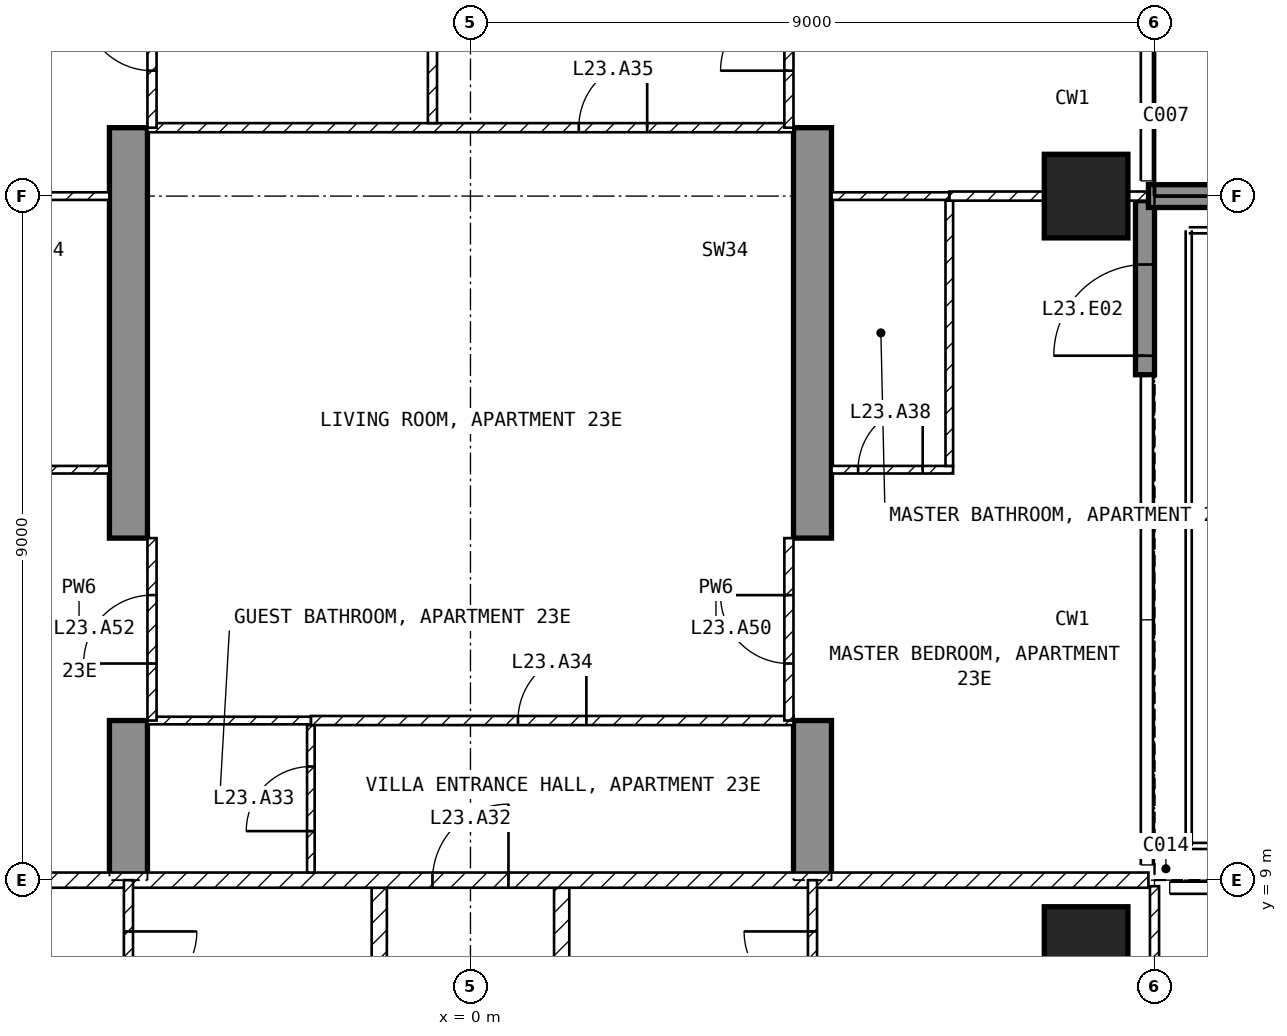
"""IFC4 building model, lengths in metres.
Left out: names, types, materials, properties, quantities, classifications, styles, units other than length and angle.
Written with IfcOpenShell. Run it as: python <this file> out.ifc"""

import sys

from ifc_helpers import new_model, si_unit, direction, frame, frame_2d, origin, origin_2d, place, context, subcontext, project, spatial, polyline, rectangle, outline, extrude, element, fill, save


model = new_model("IFC4")
c1 = context("Model", 3, precision=1e-05, world=origin(), true_north=direction((0.0, 1.0)))
c2 = subcontext(c1, "Body", "Model", "MODEL_VIEW")
j1 = project(units=[si_unit("LENGTHUNIT", "METRE"), si_unit("PLANEANGLEUNIT", "RADIAN")], contexts=[c1])
p1 = place(None, origin())
s1 = spatial("IfcSite", under=j1, at=p1, CompositionType="ELEMENT")
p2 = place(p1, origin())
s2 = spatial("IfcBuilding", under=s1, at=p2, CompositionType="ELEMENT")
p3 = place(p2, frame((0.0, 0.0, 102.4)))
s3 = spatial("IfcBuildingStorey", under=s2, at=p3, CompositionType="ELEMENT", Elevation=102.4)
for number, where, z_axis, x_axis in (
    (1, (8.1, 8.1, -0.25), (0.0, 0.0, 1.0), (1.0, 0.0, 0.0)),
    (2, (8.1, 18.0, -0.25), (0.0, 0.0, 1.0), (1.0, 0.0, 0.0)),
):
    element("IfcColumn", number, at=place(p3, frame(where, z_axis=z_axis, x_axis=x_axis)), inside=s3, PredefinedType="COLUMN", context=c2, shape_type="SweptSolid", body=[
        extrude(rectangle(XDim=1.1, YDim=1.1, at=origin_2d()), origin(), (0.0, 0.0, 1.0), 3.5),
    ])
for number, where, z_axis, x_axis in (
    (3, (-4.75, 9.0, -0.25), (1.0, 0.0, 0.0), (0.0, 1.0, 0.0)),
    (4, (4.25, 9.0, -0.25), (1.0, 0.0, 0.0), (0.0, 1.0, 0.0)),
):
    element("IfcWall", number, at=place(p3, frame(where, z_axis=z_axis, x_axis=x_axis)), inside=s3, PredefinedType="SHEAR", context=c2, shape_type="SweptSolid", body=[
        extrude(outline(polyline([(0.0, 0.0), (2.1, 0.0), (2.1, 2.65), (4.5, 2.65), (4.5, 0.0), (9.9, 0.0), (9.9, 2.65), (12.3, 2.65), (12.3, 0.0), (16.55, 0.0), (16.55, 3.5), (0.0, 3.5), (0.0, 0.0)])), origin(), (0.0, 0.0, 1.0), 0.5),
    ])
p4 = place(p3, frame((8.875, 15.65, 0.0), z_axis=(0.0, 0.0, 1.0), x_axis=(0.0, 1.0, 0.0)))
e5 = element("IfcWall", 5, at=p4, inside=s3, PredefinedType="SOLIDWALL", context=c2, shape_type="SweptSolid", body=[
    extrude(rectangle(XDim=2.29, YDim=0.25, at=frame_2d((1.145, 0.0))), origin(), (0.0, 0.0, 1.0), 3.25),
])
p5 = place(p4, frame((0.25, 0.0, 0.0)))
e6 = element("IfcOpeningElement", 6, at=p5, cuts=e5, PredefinedType="OPENING", context=c2, shape_type="SweptSolid", body=[
    extrude(rectangle(XDim=1.2, YDim=2.4, at=frame_2d((0.6, 1.2))), frame((0.0, 0.135, 0.0), z_axis=(0.0, -1.0, 0.0), x_axis=(1.0, 0.0, 0.0)), (0.0, 0.0, 1.0), 0.27),
])
p6 = place(p3, frame((8.92, 18.0, 0.0), z_axis=(0.0, 0.0, 1.0), x_axis=(1.0, 0.0, 0.0)))
e7 = element("IfcWall", 7, at=p6, inside=s3, PredefinedType="SOLIDWALL", context=c2, shape_type="SweptSolid", body=[
    extrude(rectangle(XDim=2.82, YDim=0.3, at=frame_2d((1.41, 0.0))), origin(), (0.0, 0.0, 1.0), 3.25),
])
for number, where, z_axis, x_axis in (
    (8, (1.2, 8.9, 0.0), (0.0, 0.0, 1.0), (0.0, -1.0, 0.0)),
    (9, (-1.2, 4.6, 0.0), (0.0, 0.0, 1.0), (0.0, 1.0, 0.0)),
):
    element("IfcWall", number, at=place(p3, frame(where, z_axis=z_axis, x_axis=x_axis)), inside=s3, PredefinedType="PARTITIONING", context=c2, shape_type="SweptSolid", body=[
        extrude(rectangle(XDim=4.3, YDim=0.2, at=frame_2d((2.15, 0.0))), origin(), (0.0, 0.0, 1.0), 3.25),
    ])
p7 = place(p3, frame((-8.92, 9.0, 0.0), z_axis=(0.0, 0.0, 1.0), x_axis=(1.0, 0.0, 0.0)))
e10 = element("IfcWall", 10, at=p7, inside=s3, PredefinedType="PARTITIONING", context=c2, shape_type="SweptSolid", body=[
    extrude(rectangle(XDim=17.84, YDim=0.2, at=frame_2d((8.92, 0.0))), origin(), (0.0, 0.0, 1.0), 3.25),
])
p8 = place(p7, frame((8.42, 0.0, 0.0)))
e11 = element("IfcOpeningElement", 11, at=p8, cuts=e10, PredefinedType="OPENING", context=c2, shape_type="SweptSolid", body=[
    extrude(rectangle(XDim=1.0, YDim=2.1, at=frame_2d((0.5, 1.05))), frame((0.0, 0.11, 0.0), z_axis=(0.0, -1.0, 0.0), x_axis=(1.0, 0.0, 0.0)), (0.0, 0.0, 1.0), 0.22),
])
p9 = place(p3, frame((9.0, 1.3, 0.0), z_axis=(0.0, 0.0, 1.0), x_axis=(0.0, 1.0, 0.0)))
e12 = element("IfcWall", 12, at=p9, inside=s3, PredefinedType="PARTITIONING", context=c2, shape_type="SweptSolid", body=[
    extrude(rectangle(XDim=7.62, YDim=0.12, at=frame_2d((3.81, 0.0))), origin(), (0.0, 0.0, 1.0), 3.25),
])
p10 = place(p9, frame((0.85, 0.0, 0.0)))
e13 = element("IfcOpeningElement", 13, at=p10, cuts=e12, PredefinedType="OPENING", context=c2, shape_type="SweptSolid", body=[
    extrude(rectangle(XDim=0.9, YDim=2.1, at=frame_2d((0.45, 1.05))), frame((0.0, 0.07, 0.0), z_axis=(0.0, -1.0, 0.0), x_axis=(1.0, 0.0, 0.0)), (0.0, 0.0, 1.0), 0.14),
])
p11 = place(p3, frame((4.5, 6.75, 0.0), z_axis=(0.0, 0.0, 1.0), x_axis=(0.0, 1.0, 0.0)))
e14 = element("IfcWall", 14, at=p11, inside=s3, PredefinedType="PARTITIONING", context=c2, shape_type="SweptSolid", body=[
    extrude(rectangle(XDim=2.25, YDim=0.12, at=frame_2d((1.125, 0.0))), origin(), (0.0, 0.0, 1.0), 3.25),
])
p12 = place(p11, frame((0.675, 0.0, 0.0)))
e15 = element("IfcOpeningElement", 15, at=p12, cuts=e14, PredefinedType="OPENING", context=c2, shape_type="SweptSolid", body=[
    extrude(rectangle(XDim=0.9, YDim=2.1, at=frame_2d((0.45, 1.05))), frame((0.0, 0.07, 0.0), z_axis=(0.0, -1.0, 0.0), x_axis=(1.0, 0.0, 0.0)), (0.0, 0.0, 1.0), 0.14),
])
p13 = place(p3, frame((-4.5, 9.0, 0.0), z_axis=(0.0, 0.0, 1.0), x_axis=(0.0, -1.0, 0.0)))
e16 = element("IfcWall", 16, at=p13, inside=s3, PredefinedType="PARTITIONING", context=c2, shape_type="SweptSolid", body=[
    extrude(rectangle(XDim=2.25, YDim=0.12, at=frame_2d((1.125, 0.0))), origin(), (0.0, 0.0, 1.0), 3.25),
])
p14 = place(p13, frame((0.675, 0.0, 0.0)))
e17 = element("IfcOpeningElement", 17, at=p14, cuts=e16, PredefinedType="OPENING", context=c2, shape_type="SweptSolid", body=[
    extrude(rectangle(XDim=0.9, YDim=2.1, at=frame_2d((0.45, 1.05))), frame((0.0, 0.07, 0.0), z_axis=(0.0, -1.0, 0.0), x_axis=(1.0, 0.0, 0.0)), (0.0, 0.0, 1.0), 0.14),
])
p15 = place(p3, frame((-2.1, 9.1, 0.0), z_axis=(0.0, 0.0, 1.0), x_axis=(0.0, 1.0, 0.0)))
e18 = element("IfcWall", 18, at=p15, inside=s3, PredefinedType="PARTITIONING", context=c2, shape_type="SweptSolid", body=[
    extrude(rectangle(XDim=1.94, YDim=0.1, at=frame_2d((0.97, 0.0))), origin(), (0.0, 0.0, 1.0), 3.25),
])
p16 = place(p15, frame((0.545, 0.0, 0.0)))
e19 = element("IfcOpeningElement", 19, at=p16, cuts=e18, PredefinedType="OPENING", context=c2, shape_type="SweptSolid", body=[
    extrude(rectangle(XDim=0.85, YDim=2.1, at=frame_2d((0.425, 1.05))), frame((0.0, 0.06, 0.0), z_axis=(0.0, -1.0, 0.0), x_axis=(1.0, 0.0, 0.0)), (0.0, 0.0, 1.0), 0.12),
])
p17 = place(p3, frame((-2.1, 11.1, 0.0), z_axis=(0.0, 0.0, 1.0), x_axis=(1.0, 0.0, 0.0)))
e20 = element("IfcWall", 20, at=p17, inside=s3, PredefinedType="PARTITIONING", context=c2, shape_type="SweptSolid", body=[
    extrude(rectangle(XDim=6.35, YDim=0.12, at=frame_2d((3.175, 0.0))), origin(), (0.0, 0.0, 1.0), 3.25),
])
p18 = place(p17, frame((2.725, 0.0, 0.0)))
e21 = element("IfcOpeningElement", 21, at=p18, cuts=e20, PredefinedType="OPENING", context=c2, shape_type="SweptSolid", body=[
    extrude(rectangle(XDim=0.9, YDim=2.1, at=frame_2d((0.45, 1.05))), frame((0.0, 0.07, 0.0), z_axis=(0.0, -1.0, 0.0), x_axis=(1.0, 0.0, 0.0)), (0.0, 0.0, 1.0), 0.14),
])
p19 = place(p3, frame((-4.25, 11.1, 0.0), z_axis=(0.0, 0.0, 1.0), x_axis=(1.0, 0.0, 0.0)))
e22 = element("IfcWall", 22, at=p19, inside=s3, PredefinedType="PARTITIONING", context=c2, shape_type="SweptSolid", body=[
    extrude(rectangle(XDim=2.15, YDim=0.1, at=frame_2d((1.075, 0.0))), origin(), (0.0, 0.0, 1.0), 3.25),
])
p20 = place(p3, frame((-4.25, 18.9, 0.0), z_axis=(0.0, 0.0, 1.0), x_axis=(1.0, 0.0, 0.0)))
e23 = element("IfcWall", 23, at=p20, inside=s3, PredefinedType="PARTITIONING", context=c2, shape_type="SweptSolid", body=[
    extrude(rectangle(XDim=8.5, YDim=0.12, at=frame_2d((4.25, 0.0))), origin(), (0.0, 0.0, 1.0), 3.25),
])
p21 = place(p20, frame((5.675, 0.0, 0.0)))
e24 = element("IfcOpeningElement", 24, at=p21, cuts=e23, PredefinedType="OPENING", context=c2, shape_type="SweptSolid", body=[
    extrude(rectangle(XDim=0.9, YDim=2.1, at=frame_2d((0.45, 1.05))), frame((0.0, 0.07, 0.0), z_axis=(0.0, -1.0, 0.0), x_axis=(1.0, 0.0, 0.0)), (0.0, 0.0, 1.0), 0.14),
])
p22 = place(p3, frame((-0.5, 18.96, 0.0), z_axis=(0.0, 0.0, 1.0), x_axis=(0.0, 1.0, 0.0)))
e25 = element("IfcWall", 25, at=p22, inside=s3, PredefinedType="PARTITIONING", context=c2, shape_type="SweptSolid", body=[
    extrude(rectangle(XDim=4.38, YDim=0.12, at=frame_2d((2.19, 0.0))), origin(), (0.0, 0.0, 1.0), 3.25),
])
p23 = place(p22, frame((1.74, 0.0, 0.0)))
e26 = element("IfcOpeningElement", 26, at=p23, cuts=e25, PredefinedType="OPENING", context=c2, shape_type="SweptSolid", body=[
    extrude(rectangle(XDim=0.9, YDim=2.1, at=frame_2d((0.45, 1.05))), frame((0.0, 0.07, 0.0), z_axis=(0.0, -1.0, 0.0), x_axis=(1.0, 0.0, 0.0)), (0.0, 0.0, 1.0), 0.14),
])
p24 = place(p3, frame((4.75, 14.4, 0.0), z_axis=(0.0, 0.0, 1.0), x_axis=(1.0, 0.0, 0.0)))
e27 = element("IfcWall", 27, at=p24, inside=s3, PredefinedType="PARTITIONING", context=c2, shape_type="SweptSolid", body=[
    extrude(rectangle(XDim=1.6, YDim=0.1, at=frame_2d((0.8, 0.0))), origin(), (0.0, 0.0, 1.0), 3.25),
])
p25 = place(p24, frame((0.35, 0.0, 0.0)))
e28 = element("IfcOpeningElement", 28, at=p25, cuts=e27, PredefinedType="OPENING", context=c2, shape_type="SweptSolid", body=[
    extrude(rectangle(XDim=0.85, YDim=2.1, at=frame_2d((0.425, 1.05))), frame((0.0, 0.06, 0.0), z_axis=(0.0, -1.0, 0.0), x_axis=(1.0, 0.0, 0.0)), (0.0, 0.0, 1.0), 0.12),
])
p26 = place(p3, frame((6.3, 14.45, 0.0), z_axis=(0.0, 0.0, 1.0), x_axis=(0.0, 1.0, 0.0)))
e29 = element("IfcWall", 29, at=p26, inside=s3, PredefinedType="PARTITIONING", context=c2, shape_type="SweptSolid", body=[
    extrude(rectangle(XDim=3.49, YDim=0.1, at=frame_2d((1.745, 0.0))), origin(), (0.0, 0.0, 1.0), 3.25),
])
p27 = place(p3, frame((6.3, 18.0, 0.0), z_axis=(0.0, 0.0, 1.0), x_axis=(1.0, 0.0, 0.0)))
e30 = element("IfcWall", 30, at=p27, inside=s3, PredefinedType="PARTITIONING", context=c2, shape_type="SweptSolid", body=[
    extrude(rectangle(XDim=2.62, YDim=0.12, at=frame_2d((1.31, 0.0))), origin(), (0.0, 0.0, 1.0), 2.414),
])
p28 = place(p3, frame((4.75, 18.0, 0.0), z_axis=(0.0, 0.0, 1.0), x_axis=(1.0, 0.0, 0.0)))
e31 = element("IfcWall", 31, at=p28, inside=s3, PredefinedType="PARTITIONING", context=c2, shape_type="SweptSolid", body=[
    extrude(rectangle(XDim=1.55, YDim=0.1, at=frame_2d((0.775, 0.0))), origin(), (0.0, 0.0, 1.0), 2.414),
])
p29 = place(p3, frame((-6.95, 14.4, 0.0), z_axis=(0.0, 0.0, 1.0), x_axis=(1.0, 0.0, 0.0)))
e32 = element("IfcWall", 32, at=p29, inside=s3, PredefinedType="PARTITIONING", context=c2, shape_type="SweptSolid", body=[
    extrude(rectangle(XDim=2.2, YDim=0.1, at=frame_2d((1.1, 0.0))), origin(), (0.0, 0.0, 1.0), 3.25),
])
p30 = place(p3, frame((-6.9, 18.0, 0.0), z_axis=(0.0, 0.0, 1.0), x_axis=(1.0, 0.0, 0.0)))
e33 = element("IfcWall", 33, at=p30, inside=s3, PredefinedType="PARTITIONING", context=c2, shape_type="SweptSolid", body=[
    extrude(rectangle(XDim=2.15, YDim=0.1, at=frame_2d((1.075, 0.0))), origin(), (0.0, 0.0, 1.0), 2.414),
])
p31 = place(p3, frame((4.19, 11.1, 0.0), z_axis=(0.0, 0.0, 1.0), x_axis=(0.0, 1.0, 0.0)))
e34 = element("IfcWall", 34, at=p31, inside=s3, PredefinedType="PARTITIONING", context=c2, shape_type="SweptSolid", body=[
    extrude(rectangle(XDim=2.4, YDim=0.12, at=frame_2d((1.2, 0.0))), origin(), (0.0, 0.0, 1.0), 2.4),
])
p32 = place(p31, frame((0.75, 0.0, 0.0)))
e35 = element("IfcOpeningElement", 35, at=p32, cuts=e34, PredefinedType="OPENING", context=c2, shape_type="SweptSolid", body=[
    extrude(rectangle(XDim=0.9, YDim=2.1, at=frame_2d((0.45, 1.05))), frame((0.0, 0.07, 0.0), z_axis=(0.0, -1.0, 0.0), x_axis=(1.0, 0.0, 0.0)), (0.0, 0.0, 1.0), 0.14),
])
p33 = place(p3, frame((4.19, 18.9, 0.0), z_axis=(0.0, 0.0, 1.0), x_axis=(0.0, 1.0, 0.0)))
e36 = element("IfcWall", 36, at=p33, inside=s3, PredefinedType="PARTITIONING", context=c2, shape_type="SweptSolid", body=[
    extrude(rectangle(XDim=2.4, YDim=0.12, at=frame_2d((1.2, 0.0))), origin(), (0.0, 0.0, 1.0), 2.4),
])
p34 = place(p33, frame((0.75, 0.0, 0.0)))
e37 = element("IfcOpeningElement", 37, at=p34, cuts=e36, PredefinedType="OPENING", context=c2, shape_type="SweptSolid", body=[
    extrude(rectangle(XDim=0.9, YDim=2.1, at=frame_2d((0.45, 1.05))), frame((0.0, 0.07, 0.0), z_axis=(0.0, -1.0, 0.0), x_axis=(1.0, 0.0, 0.0)), (0.0, 0.0, 1.0), 0.14),
])
p35 = place(p3, frame((-4.19, 11.1, 0.0), z_axis=(0.0, 0.0, 1.0), x_axis=(0.0, 1.0, 0.0)))
e38 = element("IfcWall", 38, at=p35, inside=s3, PredefinedType="PARTITIONING", context=c2, shape_type="SweptSolid", body=[
    extrude(rectangle(XDim=2.4, YDim=0.12, at=frame_2d((1.2, 0.0))), origin(), (0.0, 0.0, 1.0), 2.4),
])
p36 = place(p35, frame((0.75, 0.0, 0.0)))
e39 = element("IfcOpeningElement", 39, at=p36, cuts=e38, PredefinedType="OPENING", context=c2, shape_type="SweptSolid", body=[
    extrude(rectangle(XDim=0.9, YDim=2.1, at=frame_2d((0.45, 1.05))), frame((0.0, 0.07, 0.0), z_axis=(0.0, -1.0, 0.0), x_axis=(1.0, 0.0, 0.0)), (0.0, 0.0, 1.0), 0.14),
])
p37 = place(p3, frame((-4.19, 18.9, 0.0), z_axis=(0.0, 0.0, 1.0), x_axis=(0.0, 1.0, 0.0)))
e40 = element("IfcWall", 40, at=p37, inside=s3, PredefinedType="PARTITIONING", context=c2, shape_type="SweptSolid", body=[
    extrude(rectangle(XDim=2.4, YDim=0.12, at=frame_2d((1.2, 0.0))), origin(), (0.0, 0.0, 1.0), 2.4),
])
p38 = place(p37, frame((0.75, 0.0, 0.0)))
e41 = element("IfcOpeningElement", 41, at=p38, cuts=e40, PredefinedType="OPENING", context=c2, shape_type="SweptSolid", body=[
    extrude(rectangle(XDim=0.9, YDim=2.1, at=frame_2d((0.45, 1.05))), frame((0.0, 0.07, 0.0), z_axis=(0.0, -1.0, 0.0), x_axis=(1.0, 0.0, 0.0)), (0.0, 0.0, 1.0), 0.14),
])
p39 = place(p5, origin())
e42 = element("IfcDoor", 42, at=p39, inside=s3, OperationType="SINGLE_SWING_LEFT", PredefinedType="DOOR", context=c2, shape_type="SweptSolid", body=[
    extrude(rectangle(XDim=1.2, YDim=2.4, at=frame_2d((0.6, 1.2))), frame((0.0, 0.025, 0.0), z_axis=(0.0, -1.0, 0.0), x_axis=(1.0, 0.0, 0.0)), (0.0, 0.0, 1.0), 0.05),
])
fill(e6, e42)
p40 = place(p12, origin())
e43 = element("IfcDoor", 43, at=p40, inside=s3, OperationType="SINGLE_SWING_RIGHT", PredefinedType="DOOR", context=c2, shape_type="SweptSolid", body=[
    extrude(rectangle(XDim=0.9, YDim=2.1, at=frame_2d((0.45, 1.05))), frame((0.0, 0.025, 0.0), z_axis=(0.0, -1.0, 0.0), x_axis=(1.0, 0.0, 0.0)), (0.0, 0.0, 1.0), 0.05),
])
fill(e15, e43)
p41 = place(p14, origin())
e44 = element("IfcDoor", 44, at=p41, inside=s3, OperationType="SINGLE_SWING_LEFT", PredefinedType="DOOR", context=c2, shape_type="SweptSolid", body=[
    extrude(rectangle(XDim=0.9, YDim=2.1, at=frame_2d((0.45, 1.05))), frame((0.0, 0.025, 0.0), z_axis=(0.0, -1.0, 0.0), x_axis=(1.0, 0.0, 0.0)), (0.0, 0.0, 1.0), 0.05),
])
fill(e17, e44)
p42 = place(p8, origin())
e45 = element("IfcDoor", 45, at=p42, inside=s3, OperationType="SINGLE_SWING_RIGHT", PredefinedType="DOOR", context=c2, shape_type="SweptSolid", body=[
    extrude(rectangle(XDim=1.0, YDim=2.1, at=frame_2d((0.5, 1.05))), frame((0.0, 0.025, 0.0), z_axis=(0.0, -1.0, 0.0), x_axis=(1.0, 0.0, 0.0)), (0.0, 0.0, 1.0), 0.05),
])
fill(e11, e45)
p43 = place(p16, origin())
e46 = element("IfcDoor", 46, at=p43, inside=s3, OperationType="SINGLE_SWING_LEFT", PredefinedType="DOOR", context=c2, shape_type="SweptSolid", body=[
    extrude(rectangle(XDim=0.85, YDim=2.1, at=frame_2d((0.425, 1.05))), frame((0.0, 0.025, 0.0), z_axis=(0.0, -1.0, 0.0), x_axis=(1.0, 0.0, 0.0)), (0.0, 0.0, 1.0), 0.05),
])
fill(e19, e46)
p44 = place(p18, origin())
e47 = element("IfcDoor", 47, at=p44, inside=s3, OperationType="SINGLE_SWING_RIGHT", PredefinedType="DOOR", context=c2, shape_type="SweptSolid", body=[
    extrude(rectangle(XDim=0.9, YDim=2.1, at=frame_2d((0.45, 1.05))), frame((0.0, 0.025, 0.0), z_axis=(0.0, -1.0, 0.0), x_axis=(1.0, 0.0, 0.0)), (0.0, 0.0, 1.0), 0.05),
])
fill(e21, e47)
p45 = place(p21, origin())
e48 = element("IfcDoor", 48, at=p45, inside=s3, OperationType="SINGLE_SWING_RIGHT", PredefinedType="DOOR", context=c2, shape_type="SweptSolid", body=[
    extrude(rectangle(XDim=0.9, YDim=2.1, at=frame_2d((0.45, 1.05))), frame((0.0, 0.025, 0.0), z_axis=(0.0, -1.0, 0.0), x_axis=(1.0, 0.0, 0.0)), (0.0, 0.0, 1.0), 0.05),
])
fill(e24, e48)
p46 = place(p25, origin())
e49 = element("IfcDoor", 49, at=p46, inside=s3, OperationType="SINGLE_SWING_RIGHT", PredefinedType="DOOR", context=c2, shape_type="SweptSolid", body=[
    extrude(rectangle(XDim=0.85, YDim=2.1, at=frame_2d((0.425, 1.05))), frame((0.0, 0.025, 0.0), z_axis=(0.0, -1.0, 0.0), x_axis=(1.0, 0.0, 0.0)), (0.0, 0.0, 1.0), 0.05),
])
fill(e28, e49)
p47 = place(p32, origin())
e50 = element("IfcDoor", 50, at=p47, inside=s3, OperationType="SINGLE_SWING_RIGHT", PredefinedType="DOOR", context=c2, shape_type="SweptSolid", body=[
    extrude(rectangle(XDim=0.9, YDim=2.1, at=frame_2d((0.45, 1.05))), frame((0.0, 0.025, 0.0), z_axis=(0.0, -1.0, 0.0), x_axis=(1.0, 0.0, 0.0)), (0.0, 0.0, 1.0), 0.05),
])
fill(e35, e50)
p48 = place(p34, origin())
e51 = element("IfcDoor", 51, at=p48, inside=s3, OperationType="SINGLE_SWING_LEFT", PredefinedType="DOOR", context=c2, shape_type="SweptSolid", body=[
    extrude(rectangle(XDim=0.9, YDim=2.1, at=frame_2d((0.45, 1.05))), frame((0.0, 0.025, 0.0), z_axis=(0.0, -1.0, 0.0), x_axis=(1.0, 0.0, 0.0)), (0.0, 0.0, 1.0), 0.05),
])
fill(e37, e51)
p49 = place(p36, origin())
e52 = element("IfcDoor", 52, at=p49, inside=s3, OperationType="SINGLE_SWING_LEFT", PredefinedType="DOOR", context=c2, shape_type="SweptSolid", body=[
    extrude(rectangle(XDim=0.9, YDim=2.1, at=frame_2d((0.45, 1.05))), frame((0.0, 0.025, 0.0), z_axis=(0.0, -1.0, 0.0), x_axis=(1.0, 0.0, 0.0)), (0.0, 0.0, 1.0), 0.05),
])
fill(e39, e52)
p50 = place(p38, origin())
e53 = element("IfcDoor", 53, at=p50, inside=s3, OperationType="SINGLE_SWING_RIGHT", PredefinedType="DOOR", context=c2, shape_type="SweptSolid", body=[
    extrude(rectangle(XDim=0.9, YDim=2.1, at=frame_2d((0.45, 1.05))), frame((0.0, 0.025, 0.0), z_axis=(0.0, -1.0, 0.0), x_axis=(1.0, 0.0, 0.0)), (0.0, 0.0, 1.0), 0.05),
])
fill(e41, e53)
save(model, sys.argv[1])
